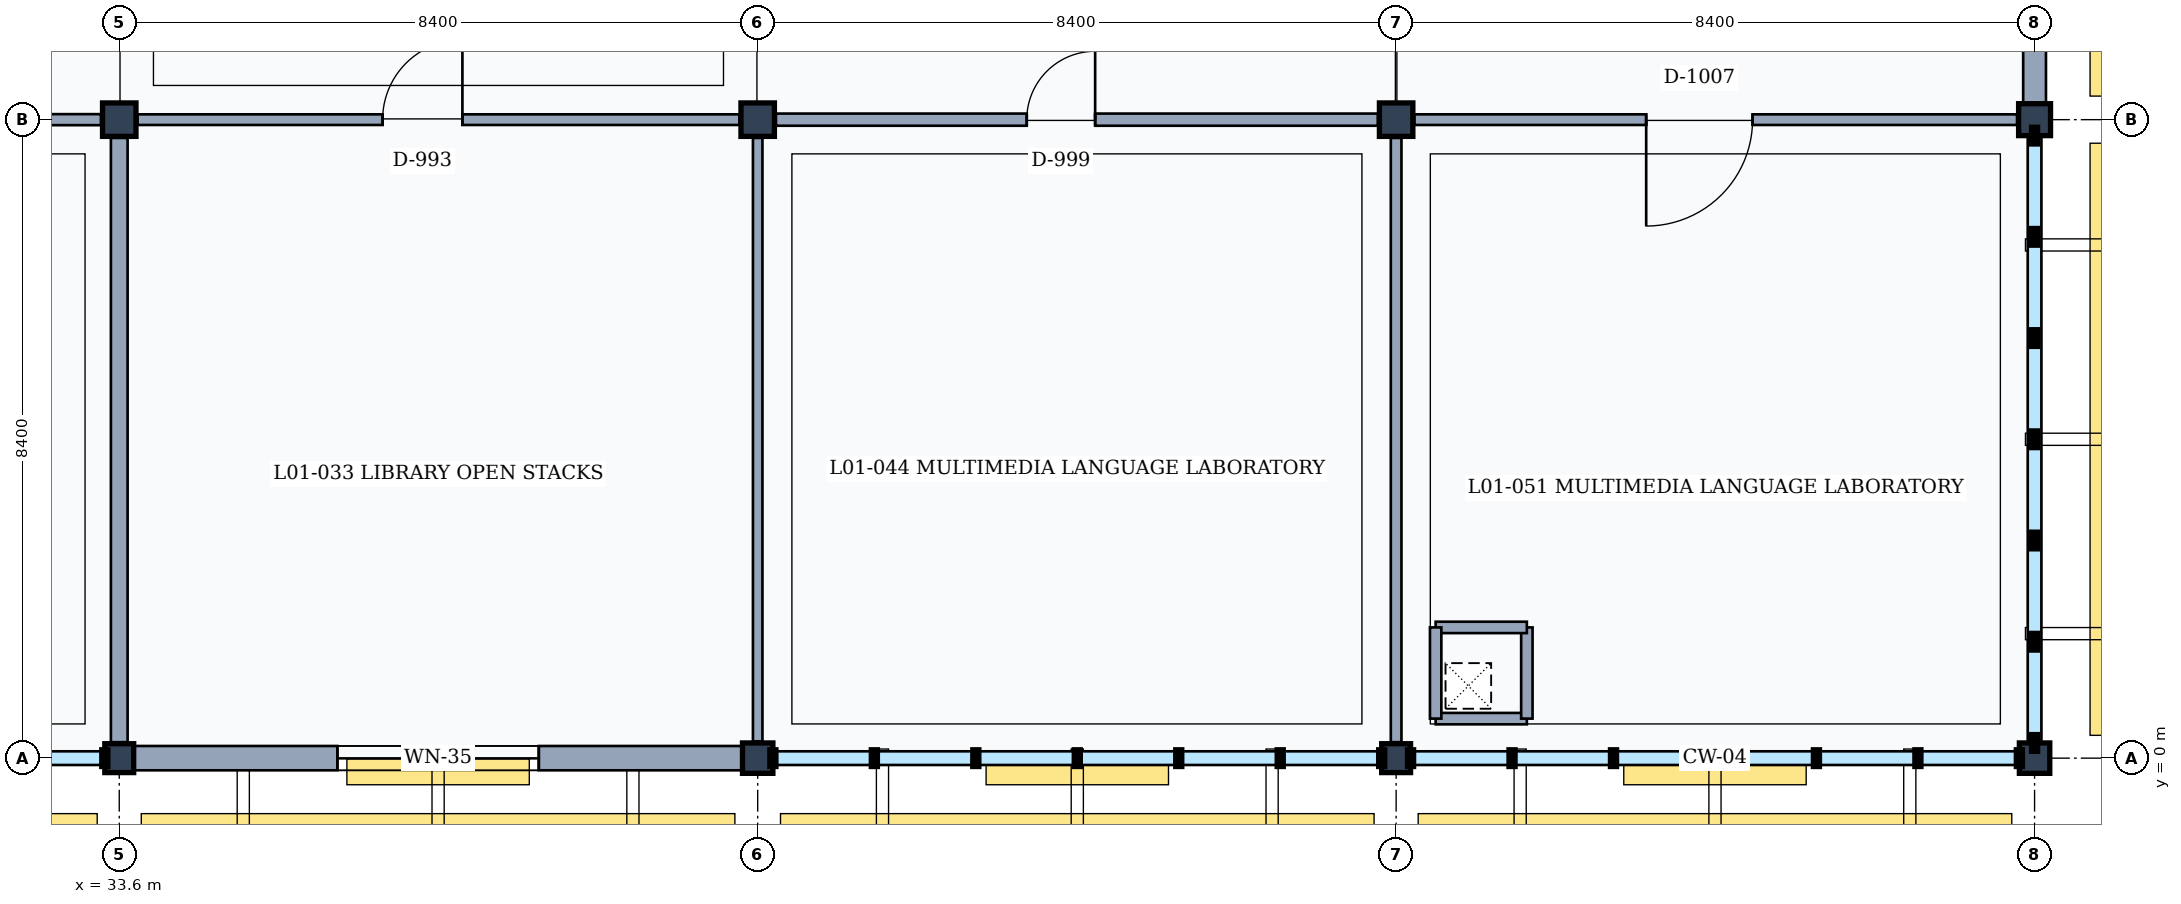
"""IFC4 building model, lengths in metres.
Left out: names, types, materials, properties, quantities, classifications, styles, units other than length and angle.
Written with IfcOpenShell. Run it as: python <this file> out.ifc"""

import sys

from ifc_helpers import new_model, si_unit, direction, frame, frame_2d, origin, origin_2d, place, context, subcontext, project, spatial, rectangle, extrude, element, fill, save


model = new_model("IFC4")
c1 = context("Model", 3, precision=1e-05, world=origin(), true_north=direction((0.0, 1.0)))
c2 = subcontext(c1, "Body", "Model", "MODEL_VIEW")
j1 = project(units=[si_unit("LENGTHUNIT", "METRE"), si_unit("PLANEANGLEUNIT", "RADIAN")], contexts=[c1])
p1 = place(None, origin())
s1 = spatial("IfcSite", under=j1, at=p1, CompositionType="ELEMENT")
p2 = place(p1, origin())
s2 = spatial("IfcBuilding", under=s1, at=p2, CompositionType="ELEMENT")
p3 = place(p2, frame((0.0, 0.0, 4.8)))
s3 = spatial("IfcBuildingStorey", under=s2, at=p3, CompositionType="ELEMENT", Elevation=4.8)
p4 = place(p3, frame((33.6, 0.0, 0.0), z_axis=(0.0, 0.0, 1.0), x_axis=(1.0, 0.0, 0.0)))
e1 = element("IfcColumn", 1, at=p4, inside=s3, PredefinedType="COLUMN", context=c2, shape_type="SweptSolid", body=[
    extrude(rectangle(XDim=0.38, YDim=0.38, at=origin_2d()), origin(), (0.0, 0.0, 1.0), 4.8),
])
p5 = place(p3, frame((33.6, 8.4, 0.0), z_axis=(0.0, 0.0, 1.0), x_axis=(1.0, 0.0, 0.0)))
e2 = element("IfcColumn", 2, at=p5, inside=s3, PredefinedType="COLUMN", context=c2, shape_type="SweptSolid", body=[
    extrude(rectangle(XDim=0.44, YDim=0.44, at=origin_2d()), origin(), (0.0, 0.0, 1.0), 4.8),
])
p6 = place(p3, frame((42.0, 0.0, 0.0), z_axis=(0.0, 0.0, 1.0), x_axis=(1.0, 0.0, 0.0)))
e3 = element("IfcColumn", 3, at=p6, inside=s3, PredefinedType="COLUMN", context=c2, shape_type="SweptSolid", body=[
    extrude(rectangle(XDim=0.4, YDim=0.4, at=origin_2d()), origin(), (0.0, 0.0, 1.0), 4.8),
])
p7 = place(p3, frame((42.0, 8.4, 0.0), z_axis=(0.0, 0.0, 1.0), x_axis=(1.0, 0.0, 0.0)))
e4 = element("IfcColumn", 4, at=p7, inside=s3, PredefinedType="COLUMN", context=c2, shape_type="SweptSolid", body=[
    extrude(rectangle(XDim=0.44, YDim=0.44, at=origin_2d()), origin(), (0.0, 0.0, 1.0), 4.8),
])
p8 = place(p3, frame((50.4, 0.0, 0.0), z_axis=(0.0, 0.0, 1.0), x_axis=(1.0, 0.0, 0.0)))
e5 = element("IfcColumn", 5, at=p8, inside=s3, PredefinedType="COLUMN", context=c2, shape_type="SweptSolid", body=[
    extrude(rectangle(XDim=0.38, YDim=0.38, at=origin_2d()), origin(), (0.0, 0.0, 1.0), 4.8),
])
p9 = place(p3, frame((50.4, 8.4, 0.0), z_axis=(0.0, 0.0, 1.0), x_axis=(1.0, 0.0, 0.0)))
e6 = element("IfcColumn", 6, at=p9, inside=s3, PredefinedType="COLUMN", context=c2, shape_type="SweptSolid", body=[
    extrude(rectangle(XDim=0.44, YDim=0.44, at=origin_2d()), origin(), (0.0, 0.0, 1.0), 4.8),
])
p10 = place(p3, frame((58.8, 0.0, 0.0), z_axis=(0.0, 0.0, 1.0), x_axis=(1.0, 0.0, 0.0)))
e7 = element("IfcColumn", 7, at=p10, inside=s3, PredefinedType="COLUMN", context=c2, shape_type="SweptSolid", body=[
    extrude(rectangle(XDim=0.4, YDim=0.4, at=origin_2d()), origin(), (0.0, 0.0, 1.0), 4.8),
])
p11 = place(p3, frame((58.8, 8.4, 0.0), z_axis=(0.0, 0.0, 1.0), x_axis=(1.0, 0.0, 0.0)))
e8 = element("IfcColumn", 8, at=p11, inside=s3, PredefinedType="COLUMN", context=c2, shape_type="SweptSolid", body=[
    extrude(rectangle(XDim=0.42, YDim=0.42, at=origin_2d()), origin(), (0.0, 0.0, 1.0), 4.8),
])
p12 = place(p3, frame((41.8, 0.0, 0.0), z_axis=(0.0, 0.0, 1.0), x_axis=(-1.0, 0.0, 0.0)))
e9 = element("IfcWall", 9, at=p12, inside=s3, PredefinedType="SOLIDWALL", context=c2, shape_type="SweptSolid", body=[
    extrude(rectangle(XDim=8.01, YDim=0.32, at=frame_2d((4.005, 0.0))), origin(), (0.0, 0.0, 1.0), 3.96),
])
p13 = place(p12, frame((2.68, 0.0, 0.9)))
e10 = element("IfcOpeningElement", 10, at=p13, cuts=e9, PredefinedType="OPENING", context=c2, shape_type="SweptSolid", body=[
    extrude(rectangle(XDim=2.65, YDim=1.8, at=frame_2d((1.325, 0.9))), frame((0.0, 0.17, 0.0), z_axis=(0.0, -1.0, 0.0), x_axis=(1.0, 0.0, 0.0)), (0.0, 0.0, 1.0), 0.34),
])
p14 = place(p3, frame((58.8, 16.59, 0.0), z_axis=(0.0, 0.0, 1.0), x_axis=(0.0, -1.0, 0.0)))
e11 = element("IfcWall", 11, at=p14, inside=s3, PredefinedType="SOLIDWALL", context=c2, shape_type="SweptSolid", body=[
    extrude(rectangle(XDim=7.98, YDim=0.3, at=frame_2d((3.99, 0.0))), origin(), (0.0, 0.0, 1.0), 3.96),
])
p15 = place(p14, frame((2.89, 0.0, 0.9)))
e12 = element("IfcOpeningElement", 12, at=p15, cuts=e11, PredefinedType="OPENING", context=c2, shape_type="SweptSolid", body=[
    extrude(rectangle(XDim=2.2, YDim=1.9, at=frame_2d((1.1, 0.95))), frame((0.0, 0.16, 0.0), z_axis=(0.0, -1.0, 0.0), x_axis=(1.0, 0.0, 0.0)), (0.0, 0.0, 1.0), 0.32),
])
p16 = place(p3, frame((50.92, 0.52, 0.0), z_axis=(0.0, 0.0, 1.0), x_axis=(1.0, 0.0, 0.0)))
e13 = element("IfcWall", 13, at=p16, inside=s3, PredefinedType="PARTITIONING", context=c2, shape_type="SweptSolid", body=[
    extrude(rectangle(XDim=1.2, YDim=0.15, at=frame_2d((0.6, 0.0))), origin(), (0.0, 0.0, 1.0), 4.56),
])
p17 = place(p3, frame((52.12, 0.52, 0.0), z_axis=(0.0, 0.0, 1.0), x_axis=(0.0, 1.0, 0.0)))
e14 = element("IfcWall", 14, at=p17, inside=s3, PredefinedType="PARTITIONING", context=c2, shape_type="SweptSolid", body=[
    extrude(rectangle(XDim=1.2, YDim=0.15, at=frame_2d((0.6, 0.0))), origin(), (0.0, 0.0, 1.0), 4.56),
])
p18 = place(p3, frame((52.12, 1.72, 0.0), z_axis=(0.0, 0.0, 1.0), x_axis=(-1.0, 0.0, 0.0)))
e15 = element("IfcWall", 15, at=p18, inside=s3, PredefinedType="PARTITIONING", context=c2, shape_type="SweptSolid", body=[
    extrude(rectangle(XDim=1.2, YDim=0.15, at=frame_2d((0.6, 0.0))), origin(), (0.0, 0.0, 1.0), 4.56),
])
p19 = place(p3, frame((50.92, 1.72, 0.0), z_axis=(0.0, 0.0, 1.0), x_axis=(0.0, -1.0, 0.0)))
e16 = element("IfcWall", 16, at=p19, inside=s3, PredefinedType="PARTITIONING", context=c2, shape_type="SweptSolid", body=[
    extrude(rectangle(XDim=1.2, YDim=0.15, at=frame_2d((0.6, 0.0))), origin(), (0.0, 0.0, 1.0), 4.56),
])
p20 = place(p3, frame((33.6, 0.21, 0.0), z_axis=(0.0, 0.0, 1.0), x_axis=(0.0, 1.0, 0.0)))
e17 = element("IfcWall", 17, at=p20, inside=s3, PredefinedType="PARTITIONING", context=c2, shape_type="SweptSolid", body=[
    extrude(rectangle(XDim=7.95, YDim=0.22, at=frame_2d((3.975, 0.0))), origin(), (0.0, 0.0, 1.0), 3.92),
])
p21 = place(p3, frame((25.44, 8.4, 0.0), z_axis=(0.0, 0.0, 1.0), x_axis=(1.0, 0.0, 0.0)))
e18 = element("IfcWall", 18, at=p21, inside=s3, PredefinedType="PARTITIONING", context=c2, shape_type="SweptSolid", body=[
    extrude(rectangle(XDim=7.92, YDim=0.145, at=frame_2d((3.96, 0.0))), origin(), (0.0, 0.0, 1.0), 3.92),
])
p22 = place(p21, frame((3.075, 0.0, 0.0)))
e19 = element("IfcOpeningElement", 19, at=p22, cuts=e18, PredefinedType="OPENING", context=c2, shape_type="SweptSolid", body=[
    extrude(rectangle(XDim=1.35, YDim=2.25, at=frame_2d((0.675, 1.125))), frame((0.0, 0.083, 0.0), z_axis=(0.0, -1.0, 0.0), x_axis=(1.0, 0.0, 0.0)), (0.0, 0.0, 1.0), 0.165),
])
p23 = place(p3, frame((42.0, 0.22, 0.0), z_axis=(0.0, 0.0, 1.0), x_axis=(0.0, 1.0, 0.0)))
e20 = element("IfcWall", 20, at=p23, inside=s3, PredefinedType="PARTITIONING", context=c2, shape_type="SweptSolid", body=[
    extrude(rectangle(XDim=7.94, YDim=0.125, at=frame_2d((3.97, 0.0))), origin(), (0.0, 0.0, 1.0), 3.92),
])
p24 = place(p3, frame((33.84, 8.4, 0.0), z_axis=(0.0, 0.0, 1.0), x_axis=(1.0, 0.0, 0.0)))
e21 = element("IfcWall", 21, at=p24, inside=s3, PredefinedType="PARTITIONING", context=c2, shape_type="SweptSolid", body=[
    extrude(rectangle(XDim=7.92, YDim=0.14, at=frame_2d((3.96, 0.0))), origin(), (0.0, 0.0, 1.0), 3.92),
])
p25 = place(p24, frame((3.225, 0.0, 0.0)))
e22 = element("IfcOpeningElement", 22, at=p25, cuts=e21, PredefinedType="OPENING", context=c2, shape_type="SweptSolid", body=[
    extrude(rectangle(XDim=1.05, YDim=2.2, at=frame_2d((0.525, 1.1))), frame((0.0, 0.08, 0.0), z_axis=(0.0, -1.0, 0.0), x_axis=(1.0, 0.0, 0.0)), (0.0, 0.0, 1.0), 0.16),
])
p26 = place(p3, frame((50.4, 0.21, 0.0), z_axis=(0.0, 0.0, 1.0), x_axis=(0.0, 1.0, 0.0)))
e23 = element("IfcWall", 23, at=p26, inside=s3, PredefinedType="PARTITIONING", context=c2, shape_type="SweptSolid", body=[
    extrude(rectangle(XDim=7.95, YDim=0.14, at=frame_2d((3.975, 0.0))), origin(), (0.0, 0.0, 1.0), 3.92),
])
p27 = place(p3, frame((42.24, 8.4, 0.0), z_axis=(0.0, 0.0, 1.0), x_axis=(1.0, 0.0, 0.0)))
e24 = element("IfcWall", 24, at=p27, inside=s3, PredefinedType="PARTITIONING", context=c2, shape_type="SweptSolid", body=[
    extrude(rectangle(XDim=7.92, YDim=0.16, at=frame_2d((3.96, 0.0))), origin(), (0.0, 0.0, 1.0), 3.92),
])
p28 = place(p27, frame((3.3, 0.0, 0.0)))
e25 = element("IfcOpeningElement", 25, at=p28, cuts=e24, PredefinedType="OPENING", context=c2, shape_type="SweptSolid", body=[
    extrude(rectangle(XDim=0.9, YDim=2.1, at=frame_2d((0.45, 1.05))), frame((0.0, 0.09, 0.0), z_axis=(0.0, -1.0, 0.0), x_axis=(1.0, 0.0, 0.0)), (0.0, 0.0, 1.0), 0.18),
])
p29 = place(p3, frame((50.64, 8.4, 0.0), z_axis=(0.0, 0.0, 1.0), x_axis=(1.0, 0.0, 0.0)))
e26 = element("IfcWall", 26, at=p29, inside=s3, PredefinedType="PARTITIONING", context=c2, shape_type="SweptSolid", body=[
    extrude(rectangle(XDim=7.93, YDim=0.14, at=frame_2d((3.965, 0.0))), origin(), (0.0, 0.0, 1.0), 3.92),
])
p30 = place(p29, frame((3.05, 0.0, 0.0)))
e27 = element("IfcOpeningElement", 27, at=p30, cuts=e26, PredefinedType="OPENING", context=c2, shape_type="SweptSolid", body=[
    extrude(rectangle(XDim=1.4, YDim=2.25, at=frame_2d((0.7, 1.125))), frame((0.0, 0.08, 0.0), z_axis=(0.0, -1.0, 0.0), x_axis=(1.0, 0.0, 0.0)), (0.0, 0.0, 1.0), 0.16),
])
p31 = place(p13, origin())
e28 = element("IfcWindow", 28, at=p31, inside=s3, PartitioningType="SINGLE_PANEL", PredefinedType="WINDOW", context=c2, shape_type="SweptSolid", body=[
    extrude(rectangle(XDim=2.65, YDim=1.8, at=frame_2d((1.325, 0.9))), frame((0.0, 0.03, 0.0), z_axis=(0.0, -1.0, 0.0), x_axis=(1.0, 0.0, 0.0)), (0.0, 0.0, 1.0), 0.06),
])
fill(e10, e28)
p32 = place(p25, origin())
e29 = element("IfcDoor", 29, at=p32, inside=s3, OperationType="SINGLE_SWING_RIGHT", PredefinedType="DOOR", context=c2, shape_type="SweptSolid", body=[
    extrude(rectangle(XDim=1.05, YDim=2.2, at=frame_2d((0.525, 1.1))), frame((0.0, 0.025, 0.0), z_axis=(0.0, -1.0, 0.0), x_axis=(1.0, 0.0, 0.0)), (0.0, 0.0, 1.0), 0.05),
])
fill(e22, e29)
p33 = place(p28, origin())
e30 = element("IfcDoor", 30, at=p33, inside=s3, OperationType="SINGLE_SWING_RIGHT", PredefinedType="DOOR", context=c2, shape_type="SweptSolid", body=[
    extrude(rectangle(XDim=0.9, YDim=2.1, at=frame_2d((0.45, 1.05))), frame((0.0, 0.025, 0.0), z_axis=(0.0, -1.0, 0.0), x_axis=(1.0, 0.0, 0.0)), (0.0, 0.0, 1.0), 0.05),
])
fill(e25, e30)
p34 = place(p30, frame((1.4, 0.0, 0.0), z_axis=(0.0, 0.0, 1.0), x_axis=(-1.0, 0.0, 0.0)))
e31 = element("IfcDoor", 31, at=p34, inside=s3, OperationType="SINGLE_SWING_RIGHT", PredefinedType="DOOR", context=c2, shape_type="SweptSolid", body=[
    extrude(rectangle(XDim=1.4, YDim=2.25, at=frame_2d((0.7, 1.125))), frame((0.0, 0.025, 0.0), z_axis=(0.0, -1.0, 0.0), x_axis=(1.0, 0.0, 0.0)), (0.0, 0.0, 1.0), 0.05),
])
fill(e27, e31)
save(model, sys.argv[1])
